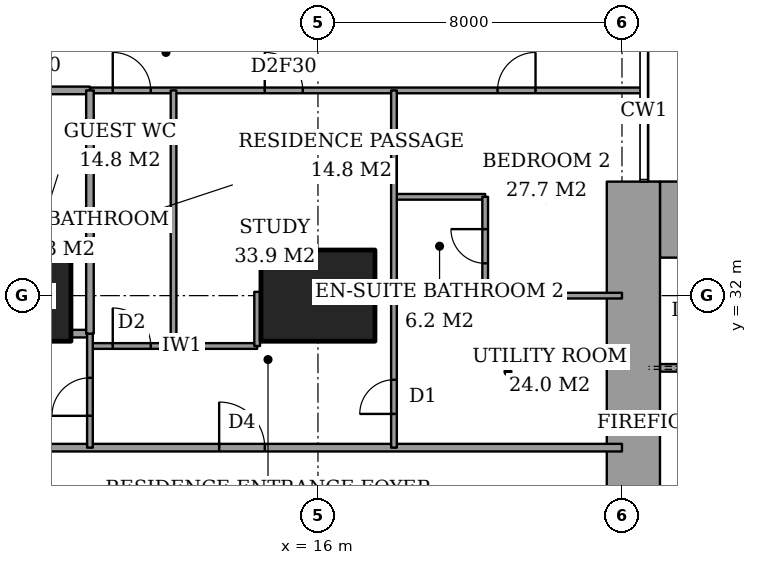
"""IFC4 building model, lengths in metres.
Left out: names, types, materials, properties, quantities, classifications, styles, units other than length and angle.
Written with IfcOpenShell. Run it as: python <this file> out.ifc"""

import sys

from ifc_helpers import new_model, si_unit, direction, frame, frame_2d, origin, origin_2d, place, context, subcontext, project, spatial, rectangle, extrude, element, fill, save


model = new_model("IFC4")
c1 = context("Model", 3, precision=1e-05, world=origin(), true_north=direction((0.0, 1.0)))
c2 = subcontext(c1, "Body", "Model", "MODEL_VIEW")
j1 = project(units=[si_unit("LENGTHUNIT", "METRE"), si_unit("PLANEANGLEUNIT", "RADIAN")], contexts=[c1])
p1 = place(None, origin())
s1 = spatial("IfcSite", under=j1, at=p1, CompositionType="ELEMENT")
p2 = place(p1, origin())
s2 = spatial("IfcBuilding", under=s1, at=p2, CompositionType="ELEMENT")
p3 = place(p2, frame((0.0, 0.0, 135.8)))
s3 = spatial("IfcBuildingStorey", under=s2, at=p3, CompositionType="ELEMENT", Elevation=135.8)
for number, where, z_axis, x_axis in (
    (1, (8.0, 32.0, 0.0), (0.0, 0.0, 1.0), (1.0, 0.0, 0.0)),
    (2, (16.0, 32.0, 0.0), (0.0, 0.0, 1.0), (1.0, 0.0, 0.0)),
):
    element("IfcColumn", number, at=place(p3, frame(where, z_axis=z_axis, x_axis=x_axis)), inside=s3, PredefinedType="COLUMN", context=c2, shape_type="SweptSolid", body=[
        extrude(rectangle(XDim=3.0, YDim=2.4, at=origin_2d()), origin(), (0.0, 0.0, 1.0), 3.6),
    ])
p4 = place(p3, frame((25.0, 34.0, 0.0), z_axis=(0.0, 0.0, 1.0), x_axis=(1.0, 0.0, 0.0)))
e3 = element("IfcWall", 3, at=p4, inside=s3, PredefinedType="SHEAR", context=c2, shape_type="SweptSolid", body=[
    extrude(rectangle(XDim=3.15, YDim=2.0, at=frame_2d((1.575, 0.0))), origin(), (0.0, 0.0, 1.0), 3.6),
])
p5 = place(p3, frame((24.3, 23.15, 0.0), z_axis=(0.0, 0.0, 1.0), x_axis=(0.0, 1.0, 0.0)))
e4 = element("IfcWall", 4, at=p5, inside=s3, PredefinedType="SHEAR", context=c2, shape_type="SweptSolid", body=[
    extrude(rectangle(XDim=11.85, YDim=1.4, at=frame_2d((5.925, 0.0))), origin(), (0.0, 0.0, 1.0), 3.6),
])
p6 = place(p5, frame((0.75, 0.0, 0.0)))
e5 = element("IfcOpeningElement", 5, at=p6, cuts=e4, PredefinedType="OPENING", context=c2, shape_type="SweptSolid", body=[
    extrude(rectangle(XDim=1.8, YDim=2.4, at=frame_2d((0.9, 1.2))), frame((0.0, 0.71, 0.0), z_axis=(0.0, -1.0, 0.0), x_axis=(1.0, 0.0, 0.0)), (0.0, 0.0, 1.0), 1.42),
])
p7 = place(p3, frame((6.725, 28.0, 0.0), z_axis=(0.0, 0.0, 1.0), x_axis=(1.0, 0.0, 0.0)))
e6 = element("IfcWall", 6, at=p7, inside=s3, PredefinedType="PARTITIONING", context=c2, shape_type="SweptSolid", body=[
    extrude(rectangle(XDim=17.275, YDim=0.2, at=frame_2d((8.637, 0.0))), origin(), (0.0, 0.0, 1.0), 3.35),
])
p8 = place(p7, frame((6.675, 0.0, 0.0)))
e7 = element("IfcOpeningElement", 7, at=p8, cuts=e6, PredefinedType="OPENING", context=c2, shape_type="SweptSolid", body=[
    extrude(rectangle(XDim=1.2, YDim=2.4, at=frame_2d((0.6, 1.2))), frame((0.0, 0.11, 0.0), z_axis=(0.0, -1.0, 0.0), x_axis=(1.0, 0.0, 0.0)), (0.0, 0.0, 1.0), 0.22),
])
p9 = place(p3, frame((10.0, 30.675, 0.0), z_axis=(0.0, 0.0, 1.0), x_axis=(1.0, 0.0, 0.0)))
e8 = element("IfcWall", 8, at=p9, inside=s3, PredefinedType="PARTITIONING", context=c2, shape_type="SweptSolid", body=[
    extrude(rectangle(XDim=4.4, YDim=0.15, at=frame_2d((2.2, 0.0))), origin(), (0.0, 0.0, 1.0), 3.35),
])
p10 = place(p9, frame((0.6, 0.0, 0.0)))
e9 = element("IfcOpeningElement", 9, at=p10, cuts=e8, PredefinedType="OPENING", context=c2, shape_type="SweptSolid", body=[
    extrude(rectangle(XDim=1.0, YDim=2.1, at=frame_2d((0.5, 1.05))), frame((0.0, 0.085, 0.0), z_axis=(0.0, -1.0, 0.0), x_axis=(1.0, 0.0, 0.0)), (0.0, 0.0, 1.0), 0.17),
])
p11 = place(p3, frame((9.5, 31.0, 0.0), z_axis=(0.0, 0.0, 1.0), x_axis=(1.0, 0.0, 0.0)))
e10 = element("IfcWall", 10, at=p11, inside=s3, PredefinedType="PARTITIONING", context=c2, shape_type="SweptSolid", body=[
    extrude(rectangle(XDim=0.5, YDim=0.2, at=frame_2d((0.25, 0.0))), origin(), (0.0, 0.0, 1.0), 3.35),
])
p12 = place(p3, frame((18.0, 32.0, 0.0), z_axis=(0.0, 0.0, 1.0), x_axis=(1.0, 0.0, 0.0)))
e11 = element("IfcWall", 11, at=p12, inside=s3, PredefinedType="PARTITIONING", context=c2, shape_type="SweptSolid", body=[
    extrude(rectangle(XDim=6.0, YDim=0.15, at=frame_2d((3.0, 0.0))), origin(), (0.0, 0.0, 1.0), 2.634),
])
p13 = place(p3, frame((17.5, 32.1, 0.0), z_axis=(0.0, 0.0, 1.0), x_axis=(1.0, 0.0, 0.0)))
e12 = element("IfcWall", 12, at=p13, inside=s3, PredefinedType="PARTITIONING", context=c2, shape_type="SweptSolid", body=[
    extrude(rectangle(XDim=0.5, YDim=0.15, at=frame_2d((0.25, 0.0))), origin(), (0.0, 0.0, 1.0), 2.634),
])
p14 = place(p3, frame((18.0, 34.6, 0.0), z_axis=(0.0, 0.0, 1.0), x_axis=(1.0, 0.0, 0.0)))
e13 = element("IfcWall", 13, at=p14, inside=s3, PredefinedType="PARTITIONING", context=c2, shape_type="SweptSolid", body=[
    extrude(rectangle(XDim=2.4, YDim=0.15, at=frame_2d((1.2, 0.0))), origin(), (0.0, 0.0, 1.0), 3.35),
])
p15 = place(p3, frame((6.725, 37.4, 0.0), z_axis=(0.0, 0.0, 1.0), x_axis=(1.0, 0.0, 0.0)))
e14 = element("IfcWall", 14, at=p15, inside=s3, PredefinedType="PARTITIONING", context=c2, shape_type="SweptSolid", body=[
    extrude(rectangle(XDim=3.275, YDim=0.2, at=frame_2d((1.637, 0.0))), origin(), (0.0, 0.0, 1.0), 3.35),
])
p16 = place(p15, frame((1.188, 0.0, 0.0)))
e15 = element("IfcOpeningElement", 15, at=p16, cuts=e14, PredefinedType="OPENING", context=c2, shape_type="SweptSolid", body=[
    extrude(rectangle(XDim=0.9, YDim=2.1, at=frame_2d((0.45, 1.05))), frame((0.0, 0.11, 0.0), z_axis=(0.0, -1.0, 0.0), x_axis=(1.0, 0.0, 0.0)), (0.0, 0.0, 1.0), 0.22),
])
p17 = place(p3, frame((10.0, 37.4, 0.0), z_axis=(0.0, 0.0, 1.0), x_axis=(1.0, 0.0, 0.0)))
e16 = element("IfcWall", 16, at=p17, inside=s3, PredefinedType="PARTITIONING", context=c2, shape_type="SweptSolid", body=[
    extrude(rectangle(XDim=14.561, YDim=0.15, at=frame_2d((7.281, 0.0))), origin(), (0.0, 0.0, 1.0), 3.35),
])
p18 = place(p17, frame((0.6, 0.0, 0.0)))
e17 = element("IfcOpeningElement", 17, at=p18, cuts=e16, PredefinedType="OPENING", context=c2, shape_type="SweptSolid", body=[
    extrude(rectangle(XDim=1.0, YDim=2.1, at=frame_2d((0.5, 1.05))), frame((0.0, 0.085, 0.0), z_axis=(0.0, -1.0, 0.0), x_axis=(1.0, 0.0, 0.0)), (0.0, 0.0, 1.0), 0.17),
])
p19 = place(p17, frame((4.6, 0.0, 0.0)))
e18 = element("IfcOpeningElement", 18, at=p19, cuts=e16, PredefinedType="OPENING", context=c2, shape_type="SweptSolid", body=[
    extrude(rectangle(XDim=1.0, YDim=2.1, at=frame_2d((0.5, 1.05))), frame((0.0, 0.085, 0.0), z_axis=(0.0, -1.0, 0.0), x_axis=(1.0, 0.0, 0.0)), (0.0, 0.0, 1.0), 0.17),
])
p20 = place(p17, frame((10.725, 0.0, 0.0)))
e19 = element("IfcOpeningElement", 19, at=p20, cuts=e16, PredefinedType="OPENING", context=c2, shape_type="SweptSolid", body=[
    extrude(rectangle(XDim=1.0, YDim=2.1, at=frame_2d((0.5, 1.05))), frame((0.0, 0.085, 0.0), z_axis=(0.0, -1.0, 0.0), x_axis=(1.0, 0.0, 0.0)), (0.0, 0.0, 1.0), 0.17),
])
p21 = place(p3, frame((10.0, 31.0, 0.0), z_axis=(0.0, 0.0, 1.0), x_axis=(0.0, 1.0, 0.0)))
e20 = element("IfcWall", 20, at=p21, inside=s3, PredefinedType="PARTITIONING", context=c2, shape_type="SweptSolid", body=[
    extrude(rectangle(XDim=6.4, YDim=0.2, at=frame_2d((3.2, 0.0))), origin(), (0.0, 0.0, 1.0), 3.35),
])
p22 = place(p3, frame((10.0, 28.0, 0.0), z_axis=(0.0, 0.0, 1.0), x_axis=(0.0, 1.0, 0.0)))
e21 = element("IfcWall", 21, at=p22, inside=s3, PredefinedType="PARTITIONING", context=c2, shape_type="SweptSolid", body=[
    extrude(rectangle(XDim=3.0, YDim=0.15, at=frame_2d((1.5, 0.0))), origin(), (0.0, 0.0, 1.0), 3.35),
])
p23 = place(p22, frame((0.837, 0.0, 0.0)))
e22 = element("IfcOpeningElement", 22, at=p23, cuts=e21, PredefinedType="OPENING", context=c2, shape_type="SweptSolid", body=[
    extrude(rectangle(XDim=1.0, YDim=2.1, at=frame_2d((0.5, 1.05))), frame((0.0, 0.085, 0.0), z_axis=(0.0, -1.0, 0.0), x_axis=(1.0, 0.0, 0.0)), (0.0, 0.0, 1.0), 0.17),
])
p24 = place(p3, frame((12.2, 30.675, 0.0), z_axis=(0.0, 0.0, 1.0), x_axis=(0.0, 1.0, 0.0)))
e23 = element("IfcWall", 23, at=p24, inside=s3, PredefinedType="PARTITIONING", context=c2, shape_type="SweptSolid", body=[
    extrude(rectangle(XDim=6.725, YDim=0.15, at=frame_2d((3.362, 0.0))), origin(), (0.0, 0.0, 1.0), 3.35),
])
p25 = place(p3, frame((14.4, 30.675, 0.0), z_axis=(0.0, 0.0, 1.0), x_axis=(0.0, 1.0, 0.0)))
e24 = element("IfcWall", 24, at=p25, inside=s3, PredefinedType="PARTITIONING", context=c2, shape_type="SweptSolid", body=[
    extrude(rectangle(XDim=1.425, YDim=0.15, at=frame_2d((0.712, 0.0))), origin(), (0.0, 0.0, 1.0), 3.35),
])
p26 = place(p3, frame((18.0, 28.0, 0.0), z_axis=(0.0, 0.0, 1.0), x_axis=(0.0, 1.0, 0.0)))
e25 = element("IfcWall", 25, at=p26, inside=s3, PredefinedType="PARTITIONING", context=c2, shape_type="SweptSolid", body=[
    extrude(rectangle(XDim=9.4, YDim=0.15, at=frame_2d((4.7, 0.0))), origin(), (0.0, 0.0, 1.0), 3.35),
])
p27 = place(p26, frame((0.887, 0.0, 0.0)))
e26 = element("IfcOpeningElement", 26, at=p27, cuts=e25, PredefinedType="OPENING", context=c2, shape_type="SweptSolid", body=[
    extrude(rectangle(XDim=0.9, YDim=2.1, at=frame_2d((0.45, 1.05))), frame((0.0, 0.085, 0.0), z_axis=(0.0, -1.0, 0.0), x_axis=(1.0, 0.0, 0.0)), (0.0, 0.0, 1.0), 0.17),
])
p28 = place(p3, frame((20.4, 32.0, 0.0), z_axis=(0.0, 0.0, 1.0), x_axis=(0.0, 1.0, 0.0)))
e27 = element("IfcWall", 27, at=p28, inside=s3, PredefinedType="PARTITIONING", context=c2, shape_type="SweptSolid", body=[
    extrude(rectangle(XDim=2.6, YDim=0.15, at=frame_2d((1.3, 0.0))), origin(), (0.0, 0.0, 1.0), 3.35),
])
p29 = place(p28, frame((0.85, 0.0, 0.0)))
e28 = element("IfcOpeningElement", 28, at=p29, cuts=e27, PredefinedType="OPENING", context=c2, shape_type="SweptSolid", body=[
    extrude(rectangle(XDim=0.9, YDim=2.1, at=frame_2d((0.45, 1.05))), frame((0.0, 0.085, 0.0), z_axis=(0.0, -1.0, 0.0), x_axis=(1.0, 0.0, 0.0)), (0.0, 0.0, 1.0), 0.17),
])
p30 = place(p3, frame((25.0, 30.1, 0.0), z_axis=(0.0, 0.0, 1.0), x_axis=(1.0, 0.0, 0.0)))
e29 = element("IfcWall", 29, at=p30, inside=s3, PredefinedType="PARTITIONING", context=c2, shape_type="SweptSolid", body=[
    extrude(rectangle(XDim=12.7, YDim=0.2, at=frame_2d((6.35, 0.0))), origin(), (0.0, 0.0, 1.0), 3.6),
])
p31 = place(p30, frame((0.9, 0.0, 0.0)))
e30 = element("IfcOpeningElement", 30, at=p31, cuts=e29, PredefinedType="OPENING", context=c2, shape_type="SweptSolid", body=[
    extrude(rectangle(XDim=1.2, YDim=2.1, at=frame_2d((0.6, 1.05))), frame((0.0, 0.11, 0.0), z_axis=(0.0, -1.0, 0.0), x_axis=(1.0, 0.0, 0.0)), (0.0, 0.0, 1.0), 0.22),
])
p32 = place(p18, origin())
e31 = element("IfcDoor", 31, at=p32, inside=s3, OperationType="SINGLE_SWING_RIGHT", PredefinedType="DOOR", context=c2, shape_type="SweptSolid", body=[
    extrude(rectangle(XDim=1.0, YDim=2.1, at=frame_2d((0.5, 1.05))), frame((0.0, 0.025, 0.0), z_axis=(0.0, -1.0, 0.0), x_axis=(1.0, 0.0, 0.0)), (0.0, 0.0, 1.0), 0.05),
])
fill(e17, e31)
p33 = place(p23, origin())
e32 = element("IfcDoor", 32, at=p33, inside=s3, OperationType="SINGLE_SWING_RIGHT", PredefinedType="DOOR", context=c2, shape_type="SweptSolid", body=[
    extrude(rectangle(XDim=1.0, YDim=2.1, at=frame_2d((0.5, 1.05))), frame((0.0, 0.025, 0.0), z_axis=(0.0, -1.0, 0.0), x_axis=(1.0, 0.0, 0.0)), (0.0, 0.0, 1.0), 0.05),
])
fill(e22, e32)
p34 = place(p8, origin())
e33 = element("IfcDoor", 33, at=p34, inside=s3, OperationType="SINGLE_SWING_RIGHT", PredefinedType="DOOR", context=c2, shape_type="SweptSolid", body=[
    extrude(rectangle(XDim=1.2, YDim=2.4, at=frame_2d((0.6, 1.2))), frame((0.0, 0.025, 0.0), z_axis=(0.0, -1.0, 0.0), x_axis=(1.0, 0.0, 0.0)), (0.0, 0.0, 1.0), 0.05),
])
fill(e7, e33)
p35 = place(p10, origin())
e34 = element("IfcDoor", 34, at=p35, inside=s3, OperationType="SINGLE_SWING_RIGHT", PredefinedType="DOOR", context=c2, shape_type="SweptSolid", body=[
    extrude(rectangle(XDim=1.0, YDim=2.1, at=frame_2d((0.5, 1.05))), frame((0.0, 0.025, 0.0), z_axis=(0.0, -1.0, 0.0), x_axis=(1.0, 0.0, 0.0)), (0.0, 0.0, 1.0), 0.05),
])
fill(e9, e34)
p36 = place(p19, origin())
e35 = element("IfcDoor", 35, at=p36, inside=s3, OperationType="SINGLE_SWING_RIGHT", PredefinedType="DOOR", context=c2, shape_type="SweptSolid", body=[
    extrude(rectangle(XDim=1.0, YDim=2.1, at=frame_2d((0.5, 1.05))), frame((0.0, 0.025, 0.0), z_axis=(0.0, -1.0, 0.0), x_axis=(1.0, 0.0, 0.0)), (0.0, 0.0, 1.0), 0.05),
])
fill(e18, e35)
p37 = place(p29, origin())
e36 = element("IfcDoor", 36, at=p37, inside=s3, OperationType="SINGLE_SWING_LEFT", PredefinedType="DOOR", context=c2, shape_type="SweptSolid", body=[
    extrude(rectangle(XDim=0.9, YDim=2.1, at=frame_2d((0.45, 1.05))), frame((0.0, 0.025, 0.0), z_axis=(0.0, -1.0, 0.0), x_axis=(1.0, 0.0, 0.0)), (0.0, 0.0, 1.0), 0.05),
])
fill(e28, e36)
p38 = place(p20, origin())
e37 = element("IfcDoor", 37, at=p38, inside=s3, OperationType="SINGLE_SWING_LEFT", PredefinedType="DOOR", context=c2, shape_type="SweptSolid", body=[
    extrude(rectangle(XDim=1.0, YDim=2.1, at=frame_2d((0.5, 1.05))), frame((0.0, 0.025, 0.0), z_axis=(0.0, -1.0, 0.0), x_axis=(1.0, 0.0, 0.0)), (0.0, 0.0, 1.0), 0.05),
])
fill(e19, e37)
p39 = place(p27, origin())
e38 = element("IfcDoor", 38, at=p39, inside=s3, OperationType="SINGLE_SWING_RIGHT", PredefinedType="DOOR", context=c2, shape_type="SweptSolid", body=[
    extrude(rectangle(XDim=0.9, YDim=2.1, at=frame_2d((0.45, 1.05))), frame((0.0, 0.025, 0.0), z_axis=(0.0, -1.0, 0.0), x_axis=(1.0, 0.0, 0.0)), (0.0, 0.0, 1.0), 0.05),
])
fill(e26, e38)
save(model, sys.argv[1])
